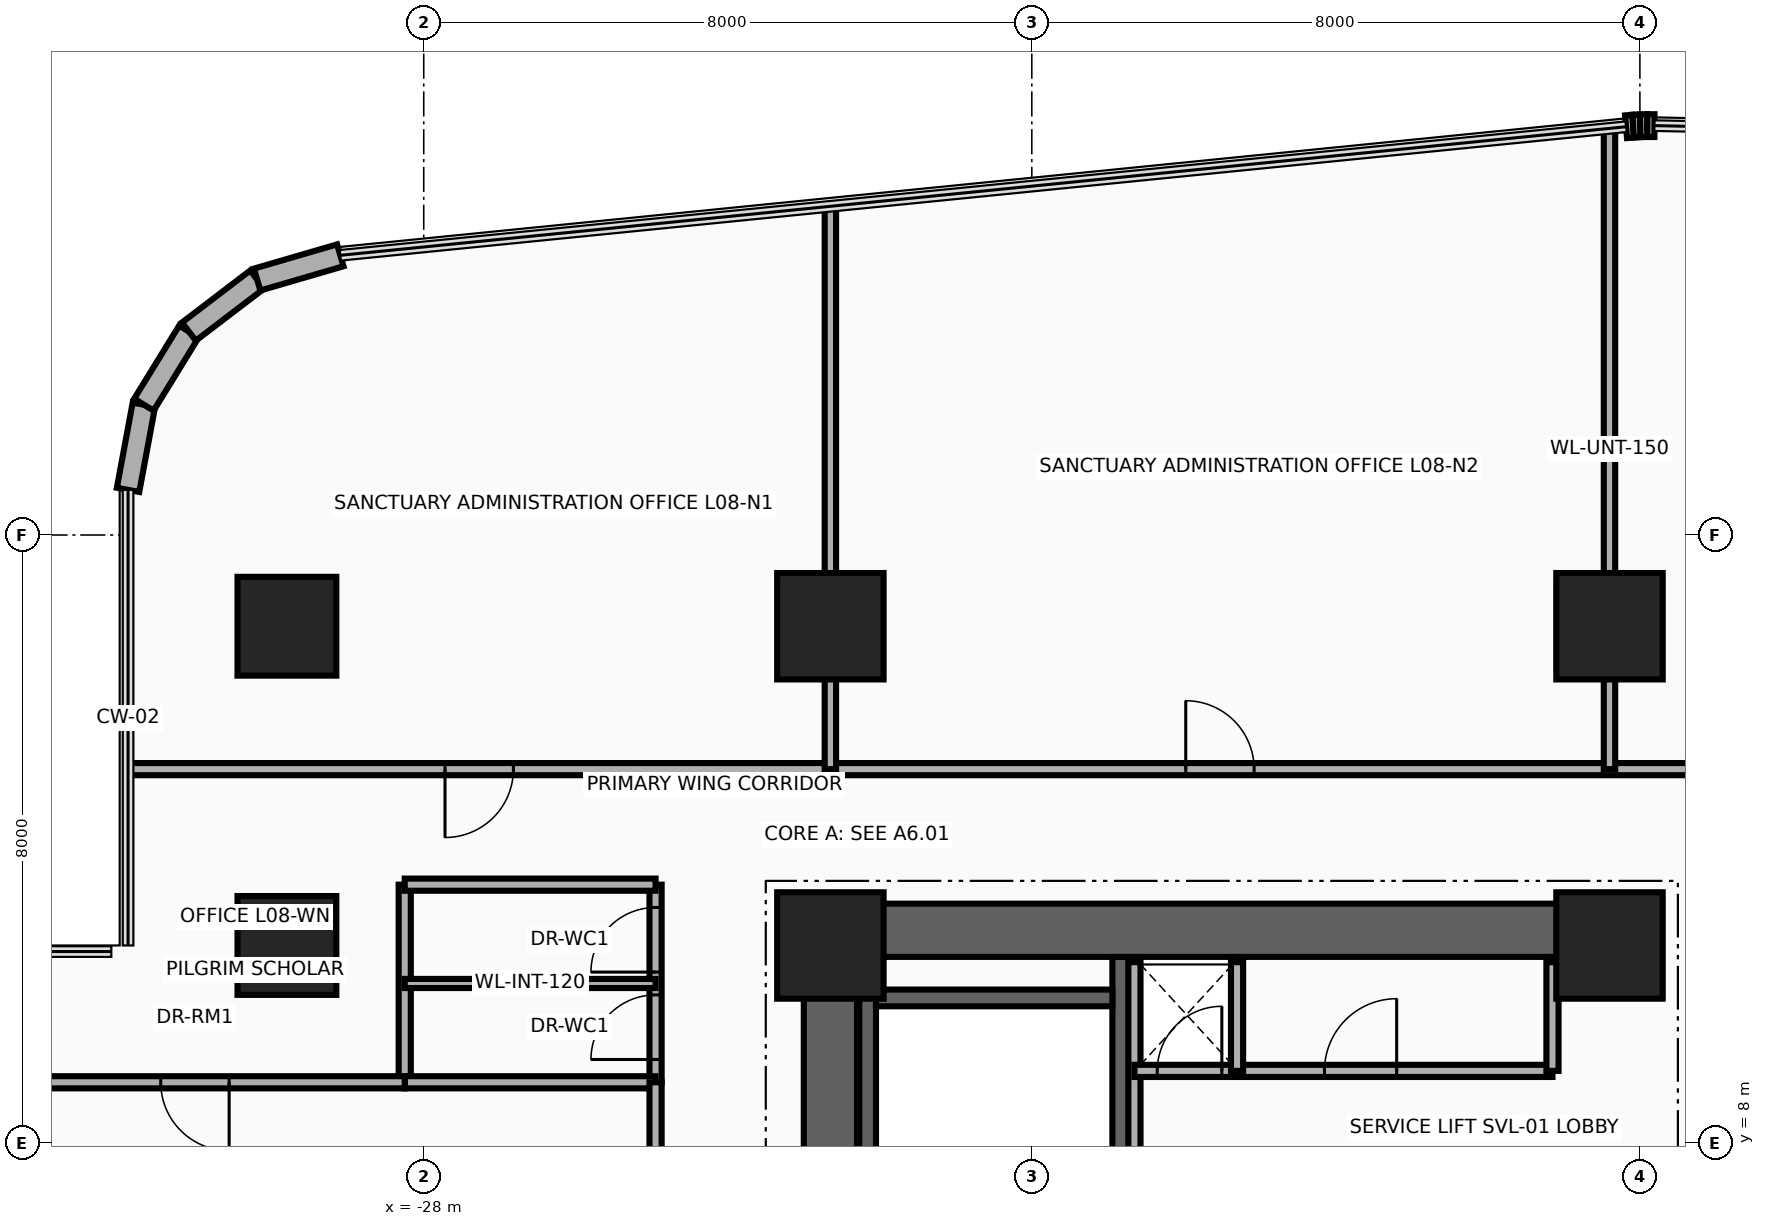
"""IFC4 building model, lengths in metres.
Left out: names, types, materials, properties, quantities, classifications, styles, units other than length and angle.
Written with IfcOpenShell. Run it as: python <this file> out.ifc"""

import sys

from ifc_helpers import new_model, si_unit, direction, frame, frame_2d, origin, origin_2d, place, context, subcontext, project, spatial, rectangle, circle, extrude, source, transform, mapped, element, fill, save


model = new_model("IFC4")
c1 = context("Model", 3, precision=1e-05, world=origin(), true_north=direction((0.0, 1.0)))
c2 = subcontext(c1, "Body", "Model", "MODEL_VIEW")
j1 = project(units=[si_unit("LENGTHUNIT", "METRE"), si_unit("PLANEANGLEUNIT", "RADIAN")], contexts=[c1])
p1 = place(None, origin())
s1 = spatial("IfcSite", under=j1, at=p1, CompositionType="ELEMENT")
p2 = place(p1, origin())
s2 = spatial("IfcBuilding", under=s1, at=p2, CompositionType="ELEMENT")
p3 = place(p2, frame((0.0, 0.0, 37.1)))
s3 = spatial("IfcBuildingStorey", under=s2, at=p3, CompositionType="ELEMENT", Elevation=37.1)
for number, where, z_axis, x_axis in (
    (1, (-22.16, 1.78, 0.0), (0.0, 0.0, 1.0), (0.0, 1.0, 0.0)),
    (2, (-18.83, 1.78, 0.0), (0.0, 0.0, 1.0), (0.0, 1.0, 0.0)),
):
    element("IfcWall", number, at=place(p3, frame(where, z_axis=z_axis, x_axis=x_axis)), inside=s3, PredefinedType="SHEAR", context=c2, shape_type="SweptSolid", body=[
        extrude(rectangle(XDim=8.67, YDim=0.22, at=frame_2d((4.335, 0.0))), origin(), (0.0, 0.0, 1.0), 3.46),
    ])
p4 = place(p3, frame((-22.05, 9.91, 0.0), z_axis=(0.0, 0.0, 1.0), x_axis=(1.0, 0.0, 0.0)))
e3 = element("IfcWall", 3, at=p4, inside=s3, PredefinedType="SHEAR", context=c2, shape_type="SweptSolid", body=[
    extrude(rectangle(XDim=3.11, YDim=0.22, at=frame_2d((1.555, 0.0))), origin(), (0.0, 0.0, 1.0), 3.46),
])
p5 = place(p3, frame((-22.65, -11.15, 0.0), z_axis=(0.0, 0.0, 1.0), x_axis=(0.0, 1.0, 0.0)))
e4 = element("IfcWall", 4, at=p5, inside=s3, PredefinedType="SHEAR", context=c2, shape_type="SweptSolid", body=[
    extrude(rectangle(XDim=22.3, YDim=0.7, at=frame_2d((11.15, 0.0))), origin(), (0.0, 0.0, 1.0), 3.46),
])
p6 = place(p3, frame((-22.65, 10.8, 0.0), z_axis=(0.0, 0.0, 1.0), x_axis=(1.0, 0.0, 0.0)))
e5 = element("IfcWall", 5, at=p6, inside=s3, PredefinedType="SHEAR", context=c2, shape_type="SweptSolid", body=[
    extrude(rectangle(XDim=10.25, YDim=0.7, at=frame_2d((5.125, 0.0))), origin(), (0.0, 0.0, 1.0), 3.46),
])
m1 = source(origin(), c2, "Body", "SweptSolid", [
    extrude(circle(Radius=0.65, at=origin_2d()), origin(), (0.0, 0.0, 1.0), 3.7),
])
p7 = place(p3, frame((-29.8, 10.6, 0.0), z_axis=(0.0, 0.0, 1.0), x_axis=(1.0, 0.0, 0.0)))
e6 = element("IfcColumn", 6, at=p7, inside=s3, PredefinedType="COLUMN", context=c2, shape_type="MappedRepresentation", body=[
    mapped(m1, transform((0.0, 0.0, 0.0), x_axis=(1.0, 0.0, 0.0), y_axis=(0.0, 1.0, 0.0), z_axis=(0.0, 0.0, 1.0), scale=1.0)),
])
m2 = source(origin(), c2, "Body", "SweptSolid", [
    extrude(rectangle(XDim=1.4, YDim=1.4, at=origin_2d()), origin(), (0.0, 0.0, 1.0), 3.7),
])
for number, where, z_axis, x_axis in (
    (7, (-22.65, 10.6, 0.0), (0.0, 0.0, 1.0), (1.0, 0.0, 0.0)),
    (8, (-12.4, 10.6, 0.0), (0.0, 0.0, 1.0), (1.0, 0.0, 0.0)),
):
    element("IfcColumn", number, at=place(p3, frame(where, z_axis=z_axis, x_axis=x_axis)), inside=s3, PredefinedType="COLUMN", context=c2, shape_type="MappedRepresentation", body=[
        mapped(m2, transform((0.0, 0.0, 0.0), x_axis=(1.0, 0.0, 0.0), y_axis=(0.0, 1.0, 0.0), z_axis=(0.0, 0.0, 1.0), scale=1.0)),
    ])
p8 = place(p3, frame((-29.8, 14.8, 0.0), z_axis=(0.0, 0.0, 1.0), x_axis=(1.0, 0.0, 0.0)))
e9 = element("IfcColumn", 9, at=p8, inside=s3, PredefinedType="COLUMN", context=c2, shape_type="MappedRepresentation", body=[
    mapped(m1, transform((0.0, 0.0, 0.0), x_axis=(1.0, 0.0, 0.0), y_axis=(0.0, 1.0, 0.0), z_axis=(0.0, 0.0, 1.0), scale=1.0)),
])
for number, where, z_axis, x_axis in (
    (10, (-22.65, 14.8, 0.0), (0.0, 0.0, 1.0), (1.0, 0.0, 0.0)),
    (11, (-12.4, 14.8, 0.0), (0.0, 0.0, 1.0), (1.0, 0.0, 0.0)),
):
    element("IfcColumn", number, at=place(p3, frame(where, z_axis=z_axis, x_axis=x_axis)), inside=s3, PredefinedType="COLUMN", context=c2, shape_type="MappedRepresentation", body=[
        mapped(m2, transform((0.0, 0.0, 0.0), x_axis=(1.0, 0.0, 0.0), y_axis=(0.0, 1.0, 0.0), z_axis=(0.0, 0.0, 1.0), scale=1.0)),
    ])
p9 = place(p3, frame((-31.89, 16.594, 0.0), z_axis=(0.0, 0.0, 1.0), x_axis=(0.182748995683, 0.9831596028, 0.0)))
e12 = element("IfcWall", 12, at=p9, inside=s3, PredefinedType="SOLIDWALL", context=c2, shape_type="SweptSolid", body=[
    extrude(rectangle(XDim=1.14, YDim=0.3, at=frame_2d((0.57, 0.0))), origin(), (0.0, 0.0, 1.0), 3.46),
])
p10 = place(p3, frame((-31.682, 17.714, 0.0), z_axis=(0.0, 0.0, 1.0), x_axis=(0.524157723014, 0.8516212077, 0.0)))
e13 = element("IfcWall", 13, at=p10, inside=s3, PredefinedType="SOLIDWALL", context=c2, shape_type="SweptSolid", body=[
    extrude(rectangle(XDim=1.129, YDim=0.3, at=frame_2d((0.565, 0.0))), origin(), (0.0, 0.0, 1.0), 3.46),
])
p11 = place(p3, frame((-31.09, 18.676, 0.0), z_axis=(0.0, 0.0, 1.0), x_axis=(0.795253002434, 0.606277710393, 0.0)))
e14 = element("IfcWall", 14, at=p11, inside=s3, PredefinedType="SOLIDWALL", context=c2, shape_type="SweptSolid", body=[
    extrude(rectangle(XDim=1.129, YDim=0.3, at=frame_2d((0.564, 0.0))), origin(), (0.0, 0.0, 1.0), 3.46),
])
p12 = place(p3, frame((-30.192, 19.361, 0.0), z_axis=(0.0, 0.0, 1.0), x_axis=(0.960071941549, 0.279753225271, 0.0)))
e15 = element("IfcWall", 15, at=p12, inside=s3, PredefinedType="SOLIDWALL", context=c2, shape_type="SweptSolid", body=[
    extrude(rectangle(XDim=1.14, YDim=0.3, at=frame_2d((0.57, 0.0))), origin(), (0.0, 0.0, 1.0), 3.46),
])
p13 = place(p3, frame((-12.182, 21.371, 0.0), z_axis=(0.0, 0.0, 1.0), x_axis=(0.996527790842, 0.08326080759, 0.0)))
e16 = element("IfcWall", 16, at=p13, inside=s3, PredefinedType="SOLIDWALL", context=c2, shape_type="SweptSolid", body=[
    extrude(rectangle(XDim=0.094, YDim=0.3, at=frame_2d((0.047, 0.0))), origin(), (0.0, 0.0, 1.0), 3.46),
])
p14 = place(p3, frame((-12.088, 21.379, 0.0), z_axis=(0.0, 0.0, 1.0), x_axis=(0.998476480444, 0.055178963393, 0.0)))
e17 = element("IfcWall", 17, at=p14, inside=s3, PredefinedType="SOLIDWALL", context=c2, shape_type="SweptSolid", body=[
    extrude(rectangle(XDim=0.093, YDim=0.3, at=frame_2d((0.046, 0.0))), origin(), (0.0, 0.0, 1.0), 3.46),
])
p15 = place(p3, frame((-11.996, 21.384, 0.0), z_axis=(0.0, 0.0, 1.0), x_axis=(0.999722573757, 0.023553673204, 0.0)))
e18 = element("IfcWall", 18, at=p15, inside=s3, PredefinedType="SOLIDWALL", context=c2, shape_type="SweptSolid", body=[
    extrude(rectangle(XDim=0.093, YDim=0.3, at=frame_2d((0.047, 0.0))), origin(), (0.0, 0.0, 1.0), 3.46),
])
p16 = place(p3, frame((-11.902, 21.386, 0.0), z_axis=(0.0, 0.0, 1.0), x_axis=(0.999986507273, -0.005194735103, 0.0)))
e19 = element("IfcWall", 19, at=p16, inside=s3, PredefinedType="SOLIDWALL", context=c2, shape_type="SweptSolid", body=[
    extrude(rectangle(XDim=0.094, YDim=0.3, at=frame_2d((0.047, 0.0))), origin(), (0.0, 0.0, 1.0), 3.46),
])
p17 = place(p3, frame((-18.65, 7.45, 0.0), z_axis=(0.0, 0.0, 1.0), x_axis=(0.0, 1.0, 0.0)))
e20 = element("IfcWall", 20, at=p17, inside=s3, PredefinedType="PARTITIONING", context=c2, shape_type="SweptSolid", body=[
    extrude(rectangle(XDim=2.93, YDim=0.16, at=frame_2d((1.465, 0.0))), origin(), (0.0, 0.0, 1.0), 3.46),
])
p18 = place(p3, frame((-18.65, 8.95, 0.0), z_axis=(0.0, 0.0, 1.0), x_axis=(1.0, 0.0, 0.0)))
e21 = element("IfcWall", 21, at=p18, inside=s3, PredefinedType="PARTITIONING", context=c2, shape_type="SweptSolid", body=[
    extrude(rectangle(XDim=5.5, YDim=0.16, at=frame_2d((2.75, 0.0))), origin(), (0.0, 0.0, 1.0), 3.46),
])
p19 = place(p18, frame((0.3, 0.0, 0.0)))
e22 = element("IfcOpeningElement", 22, at=p19, cuts=e21, PredefinedType="OPENING", context=c2, shape_type="SweptSolid", body=[
    extrude(rectangle(XDim=0.85, YDim=2.05, at=frame_2d((0.425, 1.025))), frame((0.0, 0.095, 0.0), z_axis=(0.0, -1.0, 0.0), x_axis=(1.0, 0.0, 0.0)), (0.0, 0.0, 1.0), 0.19),
])
p20 = place(p18, frame((2.5, 0.0, 0.0)))
e23 = element("IfcOpeningElement", 23, at=p20, cuts=e21, PredefinedType="OPENING", context=c2, shape_type="SweptSolid", body=[
    extrude(rectangle(XDim=0.95, YDim=2.15, at=frame_2d((0.475, 1.075))), frame((0.0, 0.095, 0.0), z_axis=(0.0, -1.0, 0.0), x_axis=(1.0, 0.0, 0.0)), (0.0, 0.0, 1.0), 0.19),
])
for number, where, z_axis, x_axis in (
    (24, (-13.15, 8.95, 0.0), (0.0, 0.0, 1.0), (0.0, 1.0, 0.0)),
    (25, (-17.3, 8.95, 0.0), (0.0, 0.0, 1.0), (0.0, 1.0, 0.0)),
):
    element("IfcWall", number, at=place(p3, frame(where, z_axis=z_axis, x_axis=x_axis)), inside=s3, PredefinedType="PARTITIONING", context=c2, shape_type="SweptSolid", body=[
        extrude(rectangle(XDim=1.43, YDim=0.16, at=frame_2d((0.715, 0.0))), origin(), (0.0, 0.0, 1.0), 3.46),
    ])
p21 = place(p3, frame((-28.25, 8.8, 0.0), z_axis=(0.0, 0.0, 1.0), x_axis=(0.0, 1.0, 0.0)))
e26 = element("IfcWall", 26, at=p21, inside=s3, PredefinedType="PARTITIONING", context=c2, shape_type="SweptSolid", body=[
    extrude(rectangle(XDim=2.6, YDim=0.16, at=frame_2d((1.3, 0.0))), origin(), (0.0, 0.0, 1.0), 2.583),
])
p22 = place(p3, frame((-24.95, 8.8, 0.0), z_axis=(0.0, 0.0, 1.0), x_axis=(0.0, 1.0, 0.0)))
e27 = element("IfcWall", 27, at=p22, inside=s3, PredefinedType="PARTITIONING", context=c2, shape_type="SweptSolid", body=[
    extrude(rectangle(XDim=2.6, YDim=0.16, at=frame_2d((1.3, 0.0))), origin(), (0.0, 0.0, 1.0), 2.583),
])
p23 = place(p22, frame((0.3, 0.0, 0.0)))
e28 = element("IfcOpeningElement", 28, at=p23, cuts=e27, PredefinedType="OPENING", context=c2, shape_type="SweptSolid", body=[
    extrude(rectangle(XDim=0.85, YDim=2.1, at=frame_2d((0.425, 1.05))), frame((0.0, 0.095, 0.0), z_axis=(0.0, -1.0, 0.0), x_axis=(1.0, 0.0, 0.0)), (0.0, 0.0, 1.0), 0.19),
])
p24 = place(p22, frame((1.45, 0.0, 0.0)))
e29 = element("IfcOpeningElement", 29, at=p24, cuts=e27, PredefinedType="OPENING", context=c2, shape_type="SweptSolid", body=[
    extrude(rectangle(XDim=0.85, YDim=2.1, at=frame_2d((0.425, 1.05))), frame((0.0, 0.095, 0.0), z_axis=(0.0, -1.0, 0.0), x_axis=(1.0, 0.0, 0.0)), (0.0, 0.0, 1.0), 0.19),
])
for number, where, z_axis, x_axis in (
    (30, (-28.25, 8.8, 0.0), (0.0, 0.0, 1.0), (1.0, 0.0, 0.0)),
    (31, (-28.25, 11.4, 0.0), (0.0, 0.0, 1.0), (1.0, 0.0, 0.0)),
):
    element("IfcWall", number, at=place(p3, frame(where, z_axis=z_axis, x_axis=x_axis)), inside=s3, PredefinedType="PARTITIONING", context=c2, shape_type="SweptSolid", body=[
        extrude(rectangle(XDim=3.3, YDim=0.16, at=frame_2d((1.65, 0.0))), origin(), (0.0, 0.0, 1.0), 3.46),
    ])
p25 = place(p3, frame((-28.25, 10.1, 0.0), z_axis=(0.0, 0.0, 1.0), x_axis=(1.0, 0.0, 0.0)))
e32 = element("IfcWall", 32, at=p25, inside=s3, PredefinedType="PARTITIONING", context=c2, shape_type="SweptSolid", body=[
    extrude(rectangle(XDim=3.3, YDim=0.12, at=frame_2d((1.65, 0.0))), origin(), (0.0, 0.0, 1.0), 3.46),
])
p26 = place(p3, frame((-24.95, -11.42, 0.0), z_axis=(0.0, 0.0, 1.0), x_axis=(0.0, 1.0, 0.0)))
e33 = element("IfcWall", 33, at=p26, inside=s3, PredefinedType="PARTITIONING", context=c2, shape_type="SweptSolid", body=[
    extrude(rectangle(XDim=20.22, YDim=0.16, at=frame_2d((10.11, 0.0))), origin(), (0.0, 0.0, 1.0), 2.583),
])
p27 = place(p26, frame((1.572, 0.0, 0.0)))
e34 = element("IfcOpeningElement", 34, at=p27, cuts=e33, PredefinedType="OPENING", context=c2, shape_type="SweptSolid", body=[
    extrude(rectangle(XDim=0.9, YDim=2.1, at=frame_2d((0.45, 1.05))), frame((0.0, 0.095, 0.0), z_axis=(0.0, -1.0, 0.0), x_axis=(1.0, 0.0, 0.0)), (0.0, 0.0, 1.0), 0.19),
])
p28 = place(p26, frame((5.616, 0.0, 0.0)))
e35 = element("IfcOpeningElement", 35, at=p28, cuts=e33, PredefinedType="OPENING", context=c2, shape_type="SweptSolid", body=[
    extrude(rectangle(XDim=0.9, YDim=2.1, at=frame_2d((0.45, 1.05))), frame((0.0, 0.095, 0.0), z_axis=(0.0, -1.0, 0.0), x_axis=(1.0, 0.0, 0.0)), (0.0, 0.0, 1.0), 0.19),
])
p29 = place(p26, frame((9.66, 0.0, 0.0)))
e36 = element("IfcOpeningElement", 36, at=p29, cuts=e33, PredefinedType="OPENING", context=c2, shape_type="SweptSolid", body=[
    extrude(rectangle(XDim=0.9, YDim=2.1, at=frame_2d((0.45, 1.05))), frame((0.0, 0.095, 0.0), z_axis=(0.0, -1.0, 0.0), x_axis=(1.0, 0.0, 0.0)), (0.0, 0.0, 1.0), 0.19),
])
p30 = place(p26, frame((13.704, 0.0, 0.0)))
e37 = element("IfcOpeningElement", 37, at=p30, cuts=e33, PredefinedType="OPENING", context=c2, shape_type="SweptSolid", body=[
    extrude(rectangle(XDim=0.9, YDim=2.1, at=frame_2d((0.45, 1.05))), frame((0.0, 0.095, 0.0), z_axis=(0.0, -1.0, 0.0), x_axis=(1.0, 0.0, 0.0)), (0.0, 0.0, 1.0), 0.19),
])
p31 = place(p26, frame((17.748, 0.0, 0.0)))
e38 = element("IfcOpeningElement", 38, at=p31, cuts=e33, PredefinedType="OPENING", context=c2, shape_type="SweptSolid", body=[
    extrude(rectangle(XDim=0.9, YDim=2.1, at=frame_2d((0.45, 1.05))), frame((0.0, 0.095, 0.0), z_axis=(0.0, -1.0, 0.0), x_axis=(1.0, 0.0, 0.0)), (0.0, 0.0, 1.0), 0.19),
])
p32 = place(p3, frame((-33.54, 8.8, 0.0), z_axis=(0.0, 0.0, 1.0), x_axis=(1.0, 0.0, 0.0)))
e39 = element("IfcWall", 39, at=p32, inside=s3, PredefinedType="PARTITIONING", context=c2, shape_type="SweptSolid", body=[
    extrude(rectangle(XDim=5.29, YDim=0.16, at=frame_2d((2.645, 0.0))), origin(), (0.0, 0.0, 1.0), 2.896),
])
p33 = place(p32, frame((2.08, 0.0, 0.0)))
e40 = element("IfcOpeningElement", 40, at=p33, cuts=e39, PredefinedType="OPENING", context=c2, shape_type="SweptSolid", body=[
    extrude(rectangle(XDim=0.9, YDim=2.1, at=frame_2d((0.45, 1.05))), frame((0.0, 0.095, 0.0), z_axis=(0.0, -1.0, 0.0), x_axis=(1.0, 0.0, 0.0)), (0.0, 0.0, 1.0), 0.19),
])
p34 = place(p3, frame((-31.89, 12.92, 0.0), z_axis=(0.0, 0.0, 1.0), x_axis=(1.0, 0.0, 0.0)))
e41 = element("IfcWall", 41, at=p34, inside=s3, PredefinedType="PARTITIONING", context=c2, shape_type="SweptSolid", body=[
    extrude(rectangle(XDim=45.44, YDim=0.16, at=frame_2d((22.72, 0.0))), origin(), (0.0, 0.0, 1.0), 2.583),
])
p35 = place(p34, frame((4.17, 0.0, 0.0)))
e42 = element("IfcOpeningElement", 42, at=p35, cuts=e41, PredefinedType="OPENING", context=c2, shape_type="SweptSolid", body=[
    extrude(rectangle(XDim=0.9, YDim=2.1, at=frame_2d((0.45, 1.05))), frame((0.0, 0.095, 0.0), z_axis=(0.0, -1.0, 0.0), x_axis=(1.0, 0.0, 0.0)), (0.0, 0.0, 1.0), 0.19),
])
p36 = place(p34, frame((13.915, 0.0, 0.0)))
e43 = element("IfcOpeningElement", 43, at=p36, cuts=e41, PredefinedType="OPENING", context=c2, shape_type="SweptSolid", body=[
    extrude(rectangle(XDim=0.9, YDim=2.1, at=frame_2d((0.45, 1.05))), frame((0.0, 0.095, 0.0), z_axis=(0.0, -1.0, 0.0), x_axis=(1.0, 0.0, 0.0)), (0.0, 0.0, 1.0), 0.19),
])
p37 = place(p34, frame((23.24, 0.0, 0.0)))
e44 = element("IfcOpeningElement", 44, at=p37, cuts=e41, PredefinedType="OPENING", context=c2, shape_type="SweptSolid", body=[
    extrude(rectangle(XDim=0.9, YDim=2.1, at=frame_2d((0.45, 1.05))), frame((0.0, 0.095, 0.0), z_axis=(0.0, -1.0, 0.0), x_axis=(1.0, 0.0, 0.0)), (0.0, 0.0, 1.0), 0.19),
])
p38 = place(p34, frame((31.44, 0.0, 0.0)))
e45 = element("IfcOpeningElement", 45, at=p38, cuts=e41, PredefinedType="OPENING", context=c2, shape_type="SweptSolid", body=[
    extrude(rectangle(XDim=0.9, YDim=2.1, at=frame_2d((0.45, 1.05))), frame((0.0, 0.095, 0.0), z_axis=(0.0, -1.0, 0.0), x_axis=(1.0, 0.0, 0.0)), (0.0, 0.0, 1.0), 0.19),
])
p39 = place(p34, frame((40.215, 0.0, 0.0)))
e46 = element("IfcOpeningElement", 46, at=p39, cuts=e41, PredefinedType="OPENING", context=c2, shape_type="SweptSolid", body=[
    extrude(rectangle(XDim=0.9, YDim=2.1, at=frame_2d((0.45, 1.05))), frame((0.0, 0.095, 0.0), z_axis=(0.0, -1.0, 0.0), x_axis=(1.0, 0.0, 0.0)), (0.0, 0.0, 1.0), 0.19),
])
p40 = place(p3, frame((-22.65, 12.92, 0.0), z_axis=(0.0, 0.0, 1.0), x_axis=(0.0, 1.0, 0.0)))
e47 = element("IfcWall", 47, at=p40, inside=s3, PredefinedType="PARTITIONING", context=c2, shape_type="SweptSolid", body=[
    extrude(rectangle(XDim=7.405, YDim=0.15, at=frame_2d((3.702, 0.0))), origin(), (0.0, 0.0, 1.0), 2.583),
])
p41 = place(p3, frame((-12.4, 12.92, 0.0), z_axis=(0.0, 0.0, 1.0), x_axis=(0.0, 1.0, 0.0)))
e48 = element("IfcWall", 48, at=p41, inside=s3, PredefinedType="PARTITIONING", context=c2, shape_type="SweptSolid", body=[
    extrude(rectangle(XDim=8.43, YDim=0.15, at=frame_2d((4.215, 0.0))), origin(), (0.0, 0.0, 1.0), 2.583),
])
p42 = place(p19, origin())
e49 = element("IfcDoor", 49, at=p42, inside=s3, OperationType="SINGLE_SWING_LEFT", PredefinedType="DOOR", context=c2, shape_type="SweptSolid", body=[
    extrude(rectangle(XDim=0.85, YDim=2.05, at=frame_2d((0.425, 1.025))), frame((0.0, 0.025, 0.0), z_axis=(0.0, -1.0, 0.0), x_axis=(1.0, 0.0, 0.0)), (0.0, 0.0, 1.0), 0.05),
])
fill(e22, e49)
p43 = place(p20, origin())
e50 = element("IfcDoor", 50, at=p43, inside=s3, OperationType="SINGLE_SWING_RIGHT", PredefinedType="DOOR", context=c2, shape_type="SweptSolid", body=[
    extrude(rectangle(XDim=0.95, YDim=2.15, at=frame_2d((0.475, 1.075))), frame((0.0, 0.025, 0.0), z_axis=(0.0, -1.0, 0.0), x_axis=(1.0, 0.0, 0.0)), (0.0, 0.0, 1.0), 0.05),
])
fill(e23, e50)
p44 = place(p23, origin())
e51 = element("IfcDoor", 51, at=p44, inside=s3, OperationType="SINGLE_SWING_LEFT", PredefinedType="DOOR", context=c2, shape_type="SweptSolid", body=[
    extrude(rectangle(XDim=0.85, YDim=2.1, at=frame_2d((0.425, 1.05))), frame((0.0, 0.025, 0.0), z_axis=(0.0, -1.0, 0.0), x_axis=(1.0, 0.0, 0.0)), (0.0, 0.0, 1.0), 0.05),
])
fill(e28, e51)
p45 = place(p24, origin())
e52 = element("IfcDoor", 52, at=p45, inside=s3, OperationType="SINGLE_SWING_RIGHT", PredefinedType="DOOR", context=c2, shape_type="SweptSolid", body=[
    extrude(rectangle(XDim=0.85, YDim=2.1, at=frame_2d((0.425, 1.05))), frame((0.0, 0.025, 0.0), z_axis=(0.0, -1.0, 0.0), x_axis=(1.0, 0.0, 0.0)), (0.0, 0.0, 1.0), 0.05),
])
fill(e29, e52)
p46 = place(p33, frame((0.9, 0.0, 0.0), z_axis=(0.0, 0.0, 1.0), x_axis=(-1.0, 0.0, 0.0)))
e53 = element("IfcDoor", 53, at=p46, inside=s3, OperationType="SINGLE_SWING_LEFT", PredefinedType="DOOR", context=c2, shape_type="SweptSolid", body=[
    extrude(rectangle(XDim=0.9, YDim=2.1, at=frame_2d((0.45, 1.05))), frame((0.0, 0.025, 0.0), z_axis=(0.0, -1.0, 0.0), x_axis=(1.0, 0.0, 0.0)), (0.0, 0.0, 1.0), 0.05),
])
fill(e40, e53)
p47 = place(p35, frame((0.9, 0.0, 0.0), z_axis=(0.0, 0.0, 1.0), x_axis=(-1.0, 0.0, 0.0)))
e54 = element("IfcDoor", 54, at=p47, inside=s3, OperationType="SINGLE_SWING_LEFT", PredefinedType="DOOR", context=c2, shape_type="SweptSolid", body=[
    extrude(rectangle(XDim=0.9, YDim=2.1, at=frame_2d((0.45, 1.05))), frame((0.0, 0.025, 0.0), z_axis=(0.0, -1.0, 0.0), x_axis=(1.0, 0.0, 0.0)), (0.0, 0.0, 1.0), 0.05),
])
fill(e42, e54)
p48 = place(p36, origin())
e55 = element("IfcDoor", 55, at=p48, inside=s3, OperationType="SINGLE_SWING_RIGHT", PredefinedType="DOOR", context=c2, shape_type="SweptSolid", body=[
    extrude(rectangle(XDim=0.9, YDim=2.1, at=frame_2d((0.45, 1.05))), frame((0.0, 0.025, 0.0), z_axis=(0.0, -1.0, 0.0), x_axis=(1.0, 0.0, 0.0)), (0.0, 0.0, 1.0), 0.05),
])
fill(e43, e55)
save(model, sys.argv[1])
